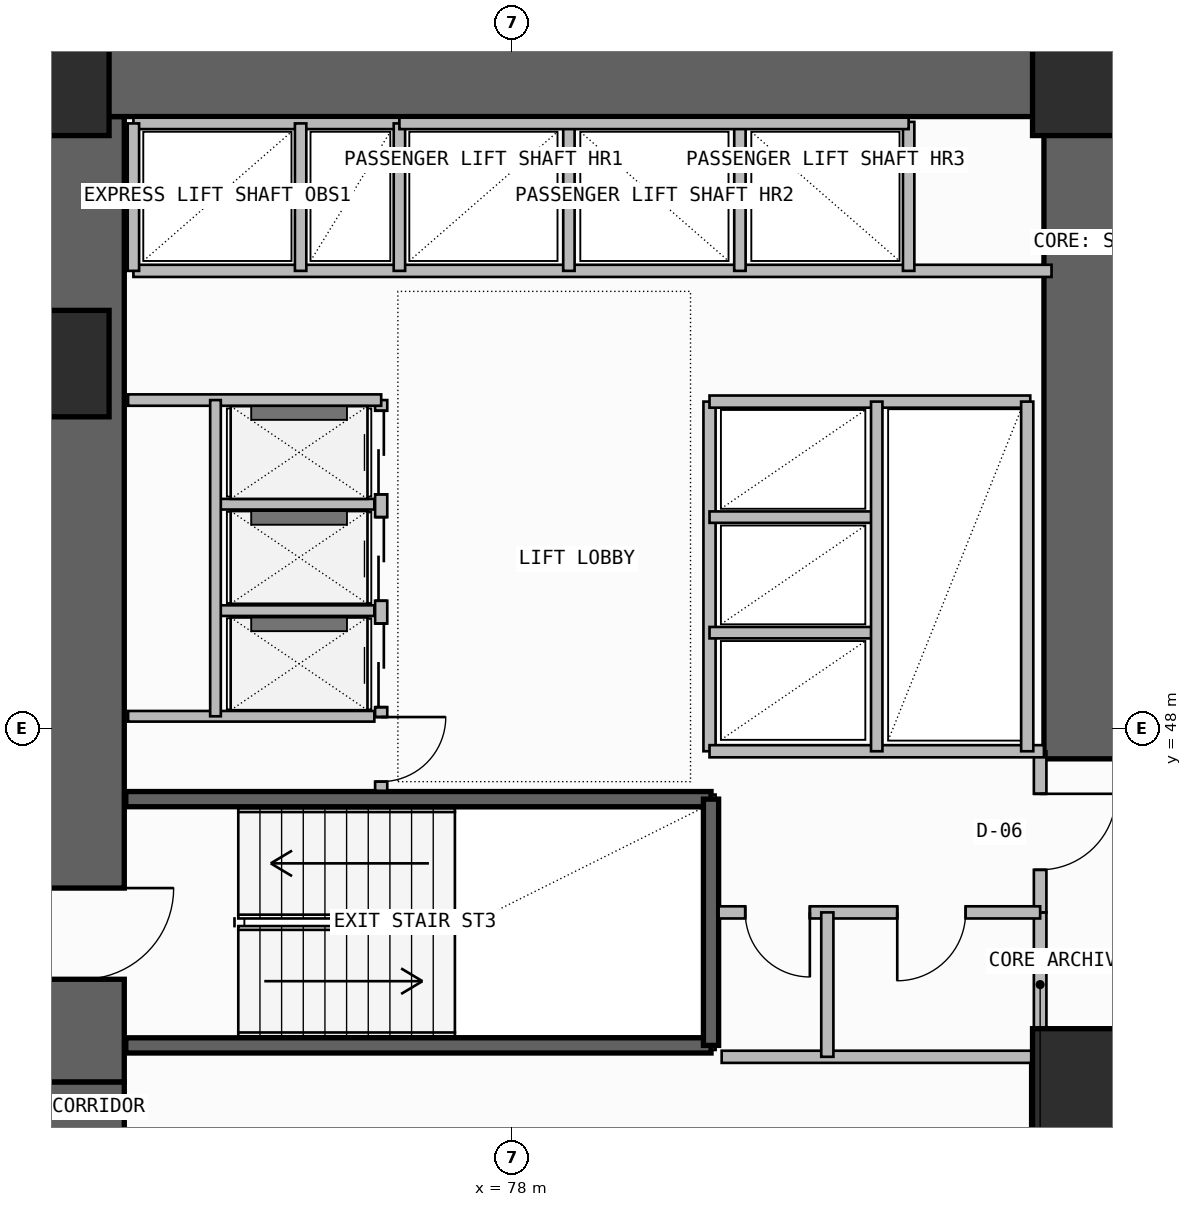
"""IFC4 building model, lengths in metres.
Left out: names, types, materials, properties, quantities, classifications, styles, units other than length and angle.
Written with IfcOpenShell. Run it as: python <this file> out.ifc"""

import sys

from ifc_helpers import new_model, si_unit, direction, frame, frame_2d, origin, origin_2d, place, context, subcontext, project, spatial, rectangle, extrude, element, fill, save


model = new_model("IFC4")
c1 = context("Model", 3, precision=1e-05, world=origin(), true_north=direction((0.0, 1.0)))
c2 = subcontext(c1, "Body", "Model", "MODEL_VIEW")
j1 = project(units=[si_unit("LENGTHUNIT", "METRE"), si_unit("PLANEANGLEUNIT", "RADIAN")], contexts=[c1])
p1 = place(None, origin())
s1 = spatial("IfcSite", under=j1, at=p1, CompositionType="ELEMENT")
p2 = place(p1, origin())
s2 = spatial("IfcBuilding", under=s1, at=p2, CompositionType="ELEMENT")
p3 = place(p2, frame((0.0, 0.0, 63.3)))
s3 = spatial("IfcBuildingStorey", under=s2, at=p3, CompositionType="ELEMENT", Elevation=63.3)
p4 = place(p3, frame((72.35, 35.5, -0.4), z_axis=(0.0, 0.0, 1.0), x_axis=(0.0, 1.0, 0.0)))
e1 = element("IfcWall", 1, at=p4, inside=s3, PredefinedType="SHEAR", context=c2, shape_type="SweptSolid", body=[
    extrude(rectangle(XDim=7.85, YDim=1.1, at=frame_2d((3.925, 0.0))), origin(), (0.0, 0.0, 1.0), 3.74),
])
p5 = place(p4, frame((1.45, 0.0, 0.4)))
e2 = element("IfcOpeningElement", 2, at=p5, cuts=e1, PredefinedType="OPENING", context=c2, shape_type="SweptSolid", body=[
    extrude(rectangle(XDim=1.2, YDim=2.2, at=frame_2d((0.6, 1.1))), frame((0.0, 0.56, 0.0), z_axis=(0.0, -1.0, 0.0), x_axis=(1.0, 0.0, 0.0)), (0.0, 0.0, 1.0), 1.12),
])
p6 = place(p3, frame((72.35, 43.35, -0.4), z_axis=(0.0, 0.0, 1.0), x_axis=(0.0, 1.0, 0.0)))
e3 = element("IfcWall", 3, at=p6, inside=s3, PredefinedType="SHEAR", context=c2, shape_type="SweptSolid", body=[
    extrude(rectangle(XDim=12.7, YDim=1.1, at=frame_2d((6.35, 0.0))), origin(), (0.0, 0.0, 1.0), 3.74),
])
p7 = place(p6, frame((1.35, 0.0, 0.4)))
e4 = element("IfcOpeningElement", 4, at=p7, cuts=e3, PredefinedType="OPENING", context=c2, shape_type="SweptSolid", body=[
    extrude(rectangle(XDim=1.2, YDim=2.2, at=frame_2d((0.6, 1.1))), frame((0.0, 0.56, 0.0), z_axis=(0.0, -1.0, 0.0), x_axis=(1.0, 0.0, 0.0)), (0.0, 0.0, 1.0), 1.12),
])
p8 = place(p3, frame((71.8, 56.6, -0.4), z_axis=(0.0, 0.0, 1.0), x_axis=(1.0, 0.0, 0.0)))
e5 = element("IfcWall", 5, at=p8, inside=s3, PredefinedType="SHEAR", context=c2, shape_type="SweptSolid", body=[
    extrude(rectangle(XDim=14.3, YDim=1.1, at=frame_2d((7.15, 0.0))), origin(), (0.0, 0.0, 1.0), 3.74),
])
p9 = place(p3, frame((85.55, 47.6, -0.4), z_axis=(0.0, 0.0, 1.0), x_axis=(0.0, 1.0, 0.0)))
e6 = element("IfcWall", 6, at=p9, inside=s3, PredefinedType="SHEAR", context=c2, shape_type="SweptSolid", body=[
    extrude(rectangle(XDim=8.45, YDim=1.1, at=frame_2d((4.225, 0.0))), origin(), (0.0, 0.0, 1.0), 3.74),
])
for number, where, z_axis, x_axis in (
    (7, (85.55, 43.35, 0.0), (0.0, 0.0, 1.0), (1.0, 0.0, 0.0)),
    (8, (72.0, 52.8, 0.0), (0.0, 0.0, 1.0), (1.0, 0.0, 0.0)),
    (9, (72.0, 56.5, 0.0), (0.0, 0.0, 1.0), (1.0, 0.0, 0.0)),
    (10, (85.55, 56.5, 0.0), (0.0, 0.0, 1.0), (1.0, 0.0, 0.0)),
):
    element("IfcColumn", number, at=place(p3, frame(where, z_axis=z_axis, x_axis=x_axis)), inside=s3, PredefinedType="COLUMN", context=c2, shape_type="SweptSolid", body=[
        extrude(rectangle(XDim=1.4, YDim=1.4, at=origin_2d()), origin(), (0.0, 0.0, 1.0), 3.6),
    ])
p10 = place(p3, frame((84.92, 38.85, 0.0), z_axis=(0.0, 0.0, 1.0), x_axis=(0.0, 1.0, 0.0)))
e11 = element("IfcWall", 11, at=p10, inside=s3, PredefinedType="SOLIDWALL", context=c2, shape_type="SweptSolid", body=[
    extrude(rectangle(XDim=4.83, YDim=0.2, at=frame_2d((2.415, 0.0))), origin(), (0.0, 0.0, 1.0), 3.34),
])
p11 = place(p10, frame((1.25, 0.0, 0.0)))
e12 = element("IfcOpeningElement", 12, at=p11, cuts=e11, PredefinedType="OPENING", context=c2, shape_type="SweptSolid", body=[
    extrude(rectangle(XDim=1.1, YDim=2.2, at=frame_2d((0.55, 1.1))), frame((0.0, 0.11, 0.0), z_axis=(0.0, -1.0, 0.0), x_axis=(1.0, 0.0, 0.0)), (0.0, 0.0, 1.0), 0.22),
])
for number, where, z_axis, x_axis in (
    (13, (72.92, 43.83, -0.4), (0.0, 0.0, 1.0), (1.0, 0.0, 0.0)),
    (14, (72.92, 47.07, -0.4), (0.0, 0.0, 1.0), (1.0, 0.0, 0.0)),
):
    element("IfcWall", number, at=place(p3, frame(where, z_axis=z_axis, x_axis=x_axis)), inside=s3, PredefinedType="SOLIDWALL", context=c2, shape_type="SweptSolid", body=[
        extrude(rectangle(XDim=7.7, YDim=0.2, at=frame_2d((3.85, 0.0))), origin(), (0.0, 0.0, 1.0), 3.74),
    ])
p12 = place(p3, frame((80.62, 43.83, -0.4), z_axis=(0.0, 0.0, 1.0), x_axis=(0.0, 1.0, 0.0)))
e15 = element("IfcWall", 15, at=p12, inside=s3, PredefinedType="SOLIDWALL", context=c2, shape_type="SweptSolid", body=[
    extrude(rectangle(XDim=3.24, YDim=0.2, at=frame_2d((1.62, 0.0))), origin(), (0.0, 0.0, 1.0), 3.74),
])
p13 = place(p3, frame((84.95, 43.68, 0.0), z_axis=(0.0, 0.0, 1.0), x_axis=(0.0, 1.0, 0.0)))
e16 = element("IfcWall", 16, at=p13, inside=s3, PredefinedType="PLUMBINGWALL", context=c2, shape_type="SweptSolid", body=[
    extrude(rectangle(XDim=1.9, YDim=0.165, at=frame_2d((0.95, 0.0))), origin(), (0.0, 0.0, 1.0), 3.34),
])
p14 = place(p3, frame((84.95, 45.58, 0.0), z_axis=(0.0, 0.0, 1.0), x_axis=(0.0, 1.0, 0.0)))
e17 = element("IfcWall", 17, at=p14, inside=s3, PredefinedType="PARTITIONING", context=c2, shape_type="SweptSolid", body=[
    extrude(rectangle(XDim=2.12, YDim=0.165, at=frame_2d((1.06, 0.0))), origin(), (0.0, 0.0, 1.0), 3.34),
])
p15 = place(p14, frame((0.56, 0.0, 0.0)))
e18 = element("IfcOpeningElement", 18, at=p15, cuts=e17, PredefinedType="OPENING", context=c2, shape_type="SweptSolid", body=[
    extrude(rectangle(XDim=1.0, YDim=2.2, at=frame_2d((0.5, 1.1))), frame((0.0, 0.093, 0.0), z_axis=(0.0, -1.0, 0.0), x_axis=(1.0, 0.0, 0.0)), (0.0, 0.0, 1.0), 0.185),
])
p16 = place(p3, frame((80.72, 45.58, 0.0), z_axis=(0.0, 0.0, 1.0), x_axis=(1.0, 0.0, 0.0)))
e19 = element("IfcWall", 19, at=p16, inside=s3, PredefinedType="PLUMBINGWALL", context=c2, shape_type="SweptSolid", body=[
    extrude(rectangle(XDim=4.23, YDim=0.16, at=frame_2d((2.115, 0.0))), origin(), (0.0, 0.0, 1.0), 3.34),
])
p17 = place(p16, frame((0.35, 0.0, 0.0)))
e20 = element("IfcOpeningElement", 20, at=p17, cuts=e19, PredefinedType="OPENING", context=c2, shape_type="SweptSolid", body=[
    extrude(rectangle(XDim=0.85, YDim=2.05, at=frame_2d((0.425, 1.025))), frame((0.0, 0.09, 0.0), z_axis=(0.0, -1.0, 0.0), x_axis=(1.0, 0.0, 0.0)), (0.0, 0.0, 1.0), 0.18),
])
p18 = place(p16, frame((2.35, 0.0, 0.0)))
e21 = element("IfcOpeningElement", 21, at=p18, cuts=e19, PredefinedType="OPENING", context=c2, shape_type="SweptSolid", body=[
    extrude(rectangle(XDim=0.9, YDim=2.1, at=frame_2d((0.45, 1.05))), frame((0.0, 0.09, 0.0), z_axis=(0.0, -1.0, 0.0), x_axis=(1.0, 0.0, 0.0)), (0.0, 0.0, 1.0), 0.18),
])
p19 = place(p3, frame((80.76, 43.68, 0.0), z_axis=(0.0, 0.0, 1.0), x_axis=(1.0, 0.0, 0.0)))
e22 = element("IfcWall", 22, at=p19, inside=s3, PredefinedType="PLUMBINGWALL", context=c2, shape_type="SweptSolid", body=[
    extrude(rectangle(XDim=4.19, YDim=0.16, at=frame_2d((2.095, 0.0))), origin(), (0.0, 0.0, 1.0), 3.34),
])
p20 = place(p3, frame((82.15, 43.68, 0.0), z_axis=(0.0, 0.0, 1.0), x_axis=(0.0, 1.0, 0.0)))
e23 = element("IfcWall", 23, at=p20, inside=s3, PredefinedType="PLUMBINGWALL", context=c2, shape_type="SweptSolid", body=[
    extrude(rectangle(XDim=1.9, YDim=0.16, at=frame_2d((0.95, 0.0))), origin(), (0.0, 0.0, 1.0), 3.34),
])
p21 = place(p3, frame((76.28, 47.18, 0.0), z_axis=(0.0, 0.0, 1.0), x_axis=(0.0, 1.0, 0.0)))
e24 = element("IfcWall", 24, at=p21, inside=s3, PredefinedType="SOLIDWALL", context=c2, shape_type="SweptSolid", body=[
    extrude(rectangle(XDim=5.14, YDim=0.16, at=frame_2d((2.57, 0.0))), origin(), (0.0, 0.0, 1.0), 3.34),
])
p22 = place(p21, frame((1.1, 0.0, 0.0)))
e25 = element("IfcOpeningElement", 25, at=p22, cuts=e24, PredefinedType="OPENING", context=c2, shape_type="SweptSolid", body=[
    extrude(rectangle(XDim=1.1, YDim=2.25, at=frame_2d((0.55, 1.125))), frame((0.0, 0.09, 0.0), z_axis=(0.0, -1.0, 0.0), x_axis=(1.0, 0.0, 0.0)), (0.0, 0.0, 1.0), 0.18),
])
p23 = place(p21, frame((2.5, 0.0, 0.0)))
e26 = element("IfcOpeningElement", 26, at=p23, cuts=e24, PredefinedType="OPENING", context=c2, shape_type="SweptSolid", body=[
    extrude(rectangle(XDim=1.1, YDim=2.25, at=frame_2d((0.55, 1.125))), frame((0.0, 0.09, 0.0), z_axis=(0.0, -1.0, 0.0), x_axis=(1.0, 0.0, 0.0)), (0.0, 0.0, 1.0), 0.18),
])
p24 = place(p21, frame((3.9, 0.0, 0.0)))
e27 = element("IfcOpeningElement", 27, at=p24, cuts=e24, PredefinedType="OPENING", context=c2, shape_type="SweptSolid", body=[
    extrude(rectangle(XDim=1.1, YDim=2.25, at=frame_2d((0.55, 1.125))), frame((0.0, 0.09, 0.0), z_axis=(0.0, -1.0, 0.0), x_axis=(1.0, 0.0, 0.0)), (0.0, 0.0, 1.0), 0.18),
])
p25 = place(p21, frame((0.12, 0.0, 0.0)))
e28 = element("IfcOpeningElement", 28, at=p25, cuts=e24, PredefinedType="OPENING", context=c2, shape_type="SweptSolid", body=[
    extrude(rectangle(XDim=0.85, YDim=2.05, at=frame_2d((0.425, 1.025))), frame((0.0, 0.09, 0.0), z_axis=(0.0, -1.0, 0.0), x_axis=(1.0, 0.0, 0.0)), (0.0, 0.0, 1.0), 0.18),
])
p26 = place(p3, frame((72.95, 52.32, 0.0), z_axis=(0.0, 0.0, 1.0), x_axis=(1.0, 0.0, 0.0)))
e29 = element("IfcWall", 29, at=p26, inside=s3, PredefinedType="SOLIDWALL", context=c2, shape_type="SweptSolid", body=[
    extrude(rectangle(XDim=3.33, YDim=0.15, at=frame_2d((1.665, 0.0))), origin(), (0.0, 0.0, 1.0), 3.34),
])
p27 = place(p3, frame((72.95, 48.16, 0.0), z_axis=(0.0, 0.0, 1.0), x_axis=(1.0, 0.0, 0.0)))
e30 = element("IfcWall", 30, at=p27, inside=s3, PredefinedType="PLUMBINGWALL", context=c2, shape_type="SweptSolid", body=[
    extrude(rectangle(XDim=3.24, YDim=0.14, at=frame_2d((1.62, 0.0))), origin(), (0.0, 0.0, 1.0), 3.34),
])
for number, where, z_axis, x_axis in (
    (31, (74.15, 49.55, 0.0), (0.0, 0.0, 1.0), (1.0, 0.0, 0.0)),
    (32, (74.15, 50.95, 0.0), (0.0, 0.0, 1.0), (1.0, 0.0, 0.0)),
):
    element("IfcWall", number, at=place(p3, frame(where, z_axis=z_axis, x_axis=x_axis)), inside=s3, PredefinedType="PLUMBINGWALL", context=c2, shape_type="SweptSolid", body=[
        extrude(rectangle(XDim=2.04, YDim=0.14, at=frame_2d((1.02, 0.0))), origin(), (0.0, 0.0, 1.0), 3.34),
    ])
p28 = place(p3, frame((74.1, 48.16, 0.0), z_axis=(0.0, 0.0, 1.0), x_axis=(0.0, 1.0, 0.0)))
e33 = element("IfcWall", 33, at=p28, inside=s3, PredefinedType="PLUMBINGWALL", context=c2, shape_type="SweptSolid", body=[
    extrude(rectangle(XDim=4.16, YDim=0.14, at=frame_2d((2.08, 0.0))), origin(), (0.0, 0.0, 1.0), 3.34),
])
p29 = place(p3, frame((80.6, 47.7, 0.0), z_axis=(0.0, 0.0, 1.0), x_axis=(0.0, 1.0, 0.0)))
e34 = element("IfcWall", 34, at=p29, inside=s3, PredefinedType="SOLIDWALL", context=c2, shape_type="SweptSolid", body=[
    extrude(rectangle(XDim=4.6, YDim=0.16, at=frame_2d((2.3, 0.0))), origin(), (0.0, 0.0, 1.0), 3.34),
])
p30 = place(p3, frame((80.6, 47.7, 0.0), z_axis=(0.0, 0.0, 1.0), x_axis=(1.0, 0.0, 0.0)))
e35 = element("IfcWall", 35, at=p30, inside=s3, PredefinedType="SOLIDWALL", context=c2, shape_type="SweptSolid", body=[
    extrude(rectangle(XDim=4.4, YDim=0.16, at=frame_2d((2.2, 0.0))), origin(), (0.0, 0.0, 1.0), 3.34),
])
p31 = place(p3, frame((80.6, 52.3, 0.0), z_axis=(0.0, 0.0, 1.0), x_axis=(1.0, 0.0, 0.0)))
e36 = element("IfcWall", 36, at=p31, inside=s3, PredefinedType="SOLIDWALL", context=c2, shape_type="SweptSolid", body=[
    extrude(rectangle(XDim=4.22, YDim=0.16, at=frame_2d((2.11, 0.0))), origin(), (0.0, 0.0, 1.0), 3.34),
])
for number, where, z_axis, x_axis in (
    (37, (80.6, 49.26, 0.0), (0.0, 0.0, 1.0), (1.0, 0.0, 0.0)),
    (38, (80.6, 50.78, 0.0), (0.0, 0.0, 1.0), (1.0, 0.0, 0.0)),
):
    element("IfcWall", number, at=place(p3, frame(where, z_axis=z_axis, x_axis=x_axis)), inside=s3, PredefinedType="PLUMBINGWALL", context=c2, shape_type="SweptSolid", body=[
        extrude(rectangle(XDim=2.2, YDim=0.15, at=frame_2d((1.1, 0.0))), origin(), (0.0, 0.0, 1.0), 3.34),
    ])
p32 = place(p3, frame((82.8, 47.7, 0.0), z_axis=(0.0, 0.0, 1.0), x_axis=(0.0, 1.0, 0.0)))
e39 = element("IfcWall", 39, at=p32, inside=s3, PredefinedType="PLUMBINGWALL", context=c2, shape_type="SweptSolid", body=[
    extrude(rectangle(XDim=4.6, YDim=0.15, at=frame_2d((2.3, 0.0))), origin(), (0.0, 0.0, 1.0), 3.34),
])
p33 = place(p3, frame((84.78, 47.7, 0.0), z_axis=(0.0, 0.0, 1.0), x_axis=(0.0, 1.0, 0.0)))
e40 = element("IfcWall", 40, at=p33, inside=s3, PredefinedType="SOLIDWALL", context=c2, shape_type="SweptSolid", body=[
    extrude(rectangle(XDim=4.6, YDim=0.16, at=frame_2d((2.3, 0.0))), origin(), (0.0, 0.0, 1.0), 3.34),
])
p34 = place(p3, frame((73.02, 54.02, 0.0), z_axis=(0.0, 0.0, 1.0), x_axis=(1.0, 0.0, 0.0)))
e41 = element("IfcWall", 41, at=p34, inside=s3, PredefinedType="SOLIDWALL", context=c2, shape_type="SweptSolid", body=[
    extrude(rectangle(XDim=12.08, YDim=0.16, at=frame_2d((6.04, 0.0))), origin(), (0.0, 0.0, 1.0), 3.34),
])
p35 = place(p3, frame((73.02, 55.96, 0.0), z_axis=(0.0, 0.0, 1.0), x_axis=(1.0, 0.0, 0.0)))
e42 = element("IfcWall", 42, at=p35, inside=s3, PredefinedType="SOLIDWALL", context=c2, shape_type="SweptSolid", body=[
    extrude(rectangle(XDim=3.5, YDim=0.15, at=frame_2d((1.75, 0.0))), origin(), (0.0, 0.0, 1.0), 3.34),
])
p36 = place(p3, frame((73.02, 54.02, 0.0), z_axis=(0.0, 0.0, 1.0), x_axis=(0.0, 1.0, 0.0)))
e43 = element("IfcWall", 43, at=p36, inside=s3, PredefinedType="PLUMBINGWALL", context=c2, shape_type="SweptSolid", body=[
    extrude(rectangle(XDim=1.94, YDim=0.15, at=frame_2d((0.97, 0.0))), origin(), (0.0, 0.0, 1.0), 3.34),
])
p37 = place(p3, frame((76.52, 54.02, 0.0), z_axis=(0.0, 0.0, 1.0), x_axis=(0.0, 1.0, 0.0)))
e44 = element("IfcWall", 44, at=p37, inside=s3, PredefinedType="SOLIDWALL", context=c2, shape_type="SweptSolid", body=[
    extrude(rectangle(XDim=1.94, YDim=0.15, at=frame_2d((0.97, 0.0))), origin(), (0.0, 0.0, 1.0), 3.34),
])
p38 = place(p3, frame((75.22, 54.02, 0.0), z_axis=(0.0, 0.0, 1.0), x_axis=(0.0, 1.0, 0.0)))
e45 = element("IfcWall", 45, at=p38, inside=s3, PredefinedType="PLUMBINGWALL", context=c2, shape_type="SweptSolid", body=[
    extrude(rectangle(XDim=1.94, YDim=0.15, at=frame_2d((0.97, 0.0))), origin(), (0.0, 0.0, 1.0), 3.34),
])
for number, where, z_axis, x_axis in (
    (46, (78.75, 54.02, 0.0), (0.0, 0.0, 1.0), (0.0, 1.0, 0.0)),
    (47, (81.0, 54.02, 0.0), (0.0, 0.0, 1.0), (0.0, 1.0, 0.0)),
):
    element("IfcWall", number, at=place(p3, frame(where, z_axis=z_axis, x_axis=x_axis)), inside=s3, PredefinedType="PLUMBINGWALL", context=c2, shape_type="SweptSolid", body=[
        extrude(rectangle(XDim=1.96, YDim=0.15, at=frame_2d((0.98, 0.0))), origin(), (0.0, 0.0, 1.0), 3.34),
    ])
p39 = place(p3, frame((83.22, 54.02, 0.0), z_axis=(0.0, 0.0, 1.0), x_axis=(0.0, 1.0, 0.0)))
e48 = element("IfcWall", 48, at=p39, inside=s3, PredefinedType="SOLIDWALL", context=c2, shape_type="SweptSolid", body=[
    extrude(rectangle(XDim=1.96, YDim=0.15, at=frame_2d((0.98, 0.0))), origin(), (0.0, 0.0, 1.0), 3.34),
])
p40 = place(p3, frame((76.52, 55.96, 0.0), z_axis=(0.0, 0.0, 1.0), x_axis=(1.0, 0.0, 0.0)))
e49 = element("IfcWall", 49, at=p40, inside=s3, PredefinedType="SOLIDWALL", context=c2, shape_type="SweptSolid", body=[
    extrude(rectangle(XDim=6.7, YDim=0.15, at=frame_2d((3.35, 0.0))), origin(), (0.0, 0.0, 1.0), 3.34),
])
p41 = place(p7, frame((1.2, 0.0, 0.0), z_axis=(0.0, 0.0, 1.0), x_axis=(-1.0, 0.0, 0.0)))
e50 = element("IfcDoor", 50, at=p41, inside=s3, OperationType="SINGLE_SWING_LEFT", PredefinedType="USERDEFINED", context=c2, shape_type="SweptSolid", body=[
    extrude(rectangle(XDim=1.2, YDim=2.2, at=frame_2d((0.6, 1.1))), frame((0.0, 0.025, 0.0), z_axis=(0.0, -1.0, 0.0), x_axis=(1.0, 0.0, 0.0)), (0.0, 0.0, 1.0), 0.05),
])
fill(e4, e50)
p42 = place(p15, frame((1.0, 0.0, 0.0), z_axis=(0.0, 0.0, 1.0), x_axis=(-1.0, 0.0, 0.0)))
e51 = element("IfcDoor", 51, at=p42, inside=s3, OperationType="SINGLE_SWING_LEFT", PredefinedType="DOOR", context=c2, shape_type="SweptSolid", body=[
    extrude(rectangle(XDim=1.0, YDim=2.2, at=frame_2d((0.5, 1.1))), frame((0.0, 0.025, 0.0), z_axis=(0.0, -1.0, 0.0), x_axis=(1.0, 0.0, 0.0)), (0.0, 0.0, 1.0), 0.05),
])
fill(e18, e51)
p43 = place(p17, frame((0.85, 0.0, 0.0), z_axis=(0.0, 0.0, 1.0), x_axis=(-1.0, 0.0, 0.0)))
e52 = element("IfcDoor", 52, at=p43, inside=s3, OperationType="SINGLE_SWING_LEFT", PredefinedType="DOOR", context=c2, shape_type="SweptSolid", body=[
    extrude(rectangle(XDim=0.85, YDim=2.05, at=frame_2d((0.425, 1.025))), frame((0.0, 0.025, 0.0), z_axis=(0.0, -1.0, 0.0), x_axis=(1.0, 0.0, 0.0)), (0.0, 0.0, 1.0), 0.05),
])
fill(e20, e52)
p44 = place(p18, frame((0.9, 0.0, 0.0), z_axis=(0.0, 0.0, 1.0), x_axis=(-1.0, 0.0, 0.0)))
e53 = element("IfcDoor", 53, at=p44, inside=s3, OperationType="SINGLE_SWING_RIGHT", PredefinedType="DOOR", context=c2, shape_type="SweptSolid", body=[
    extrude(rectangle(XDim=0.9, YDim=2.1, at=frame_2d((0.45, 1.05))), frame((0.0, 0.025, 0.0), z_axis=(0.0, -1.0, 0.0), x_axis=(1.0, 0.0, 0.0)), (0.0, 0.0, 1.0), 0.05),
])
fill(e21, e53)
p45 = place(p22, origin())
e54 = element("IfcDoor", 54, at=p45, inside=s3, OperationType="DOUBLE_DOOR_SLIDING", PredefinedType="DOOR", context=c2, shape_type="SweptSolid", body=[
    extrude(rectangle(XDim=1.1, YDim=2.25, at=frame_2d((0.55, 1.125))), frame((0.0, 0.025, 0.0), z_axis=(0.0, -1.0, 0.0), x_axis=(1.0, 0.0, 0.0)), (0.0, 0.0, 1.0), 0.05),
])
fill(e25, e54)
p46 = place(p23, origin())
e55 = element("IfcDoor", 55, at=p46, inside=s3, OperationType="DOUBLE_DOOR_SLIDING", PredefinedType="DOOR", context=c2, shape_type="SweptSolid", body=[
    extrude(rectangle(XDim=1.1, YDim=2.25, at=frame_2d((0.55, 1.125))), frame((0.0, 0.025, 0.0), z_axis=(0.0, -1.0, 0.0), x_axis=(1.0, 0.0, 0.0)), (0.0, 0.0, 1.0), 0.05),
])
fill(e26, e55)
p47 = place(p24, origin())
e56 = element("IfcDoor", 56, at=p47, inside=s3, OperationType="DOUBLE_DOOR_SLIDING", PredefinedType="DOOR", context=c2, shape_type="SweptSolid", body=[
    extrude(rectangle(XDim=1.1, YDim=2.25, at=frame_2d((0.55, 1.125))), frame((0.0, 0.025, 0.0), z_axis=(0.0, -1.0, 0.0), x_axis=(1.0, 0.0, 0.0)), (0.0, 0.0, 1.0), 0.05),
])
fill(e27, e56)
p48 = place(p25, frame((0.85, 0.0, 0.0), z_axis=(0.0, 0.0, 1.0), x_axis=(-1.0, 0.0, 0.0)))
e57 = element("IfcDoor", 57, at=p48, inside=s3, OperationType="SINGLE_SWING_LEFT", PredefinedType="DOOR", context=c2, shape_type="SweptSolid", body=[
    extrude(rectangle(XDim=0.85, YDim=2.05, at=frame_2d((0.425, 1.025))), frame((0.0, 0.025, 0.0), z_axis=(0.0, -1.0, 0.0), x_axis=(1.0, 0.0, 0.0)), (0.0, 0.0, 1.0), 0.05),
])
fill(e28, e57)
save(model, sys.argv[1])
